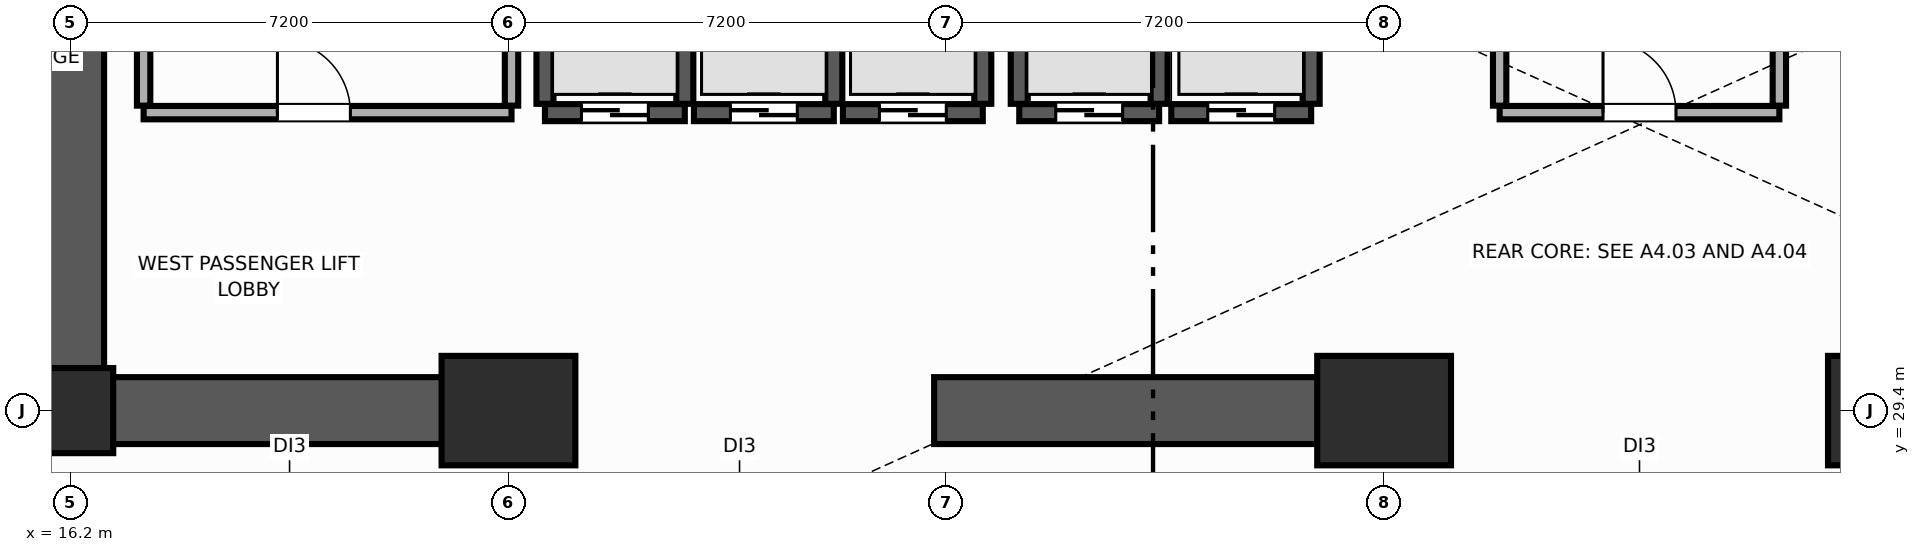
"""IFC4 building model, lengths in metres.
Left out: names, types, materials, properties, quantities, classifications, styles, units other than length and angle.
Written with IfcOpenShell. Run it as: python <this file> out.ifc"""

import sys

from ifc_helpers import new_model, si_unit, direction, frame, frame_2d, origin, origin_2d, place, context, subcontext, project, spatial, rectangle, extrude, element, fill, save


model = new_model("IFC4")
c1 = context("Model", 3, precision=1e-05, world=origin(), true_north=direction((0.0, 1.0)))
c2 = subcontext(c1, "Body", "Model", "MODEL_VIEW")
j1 = project(units=[si_unit("LENGTHUNIT", "METRE"), si_unit("PLANEANGLEUNIT", "RADIAN")], contexts=[c1])
p1 = place(None, origin())
s1 = spatial("IfcSite", under=j1, at=p1, CompositionType="ELEMENT")
p2 = place(p1, origin())
s2 = spatial("IfcBuilding", under=s1, at=p2, CompositionType="ELEMENT")
p3 = place(p2, origin())
s3 = spatial("IfcBuildingStorey", under=s2, at=p3, CompositionType="ELEMENT", Elevation=0.0)
for number, where, z_axis, x_axis in (
    (1, (23.4, 29.4, 0.0), (0.0, 0.0, 1.0), (1.0, 0.0, 0.0)),
    (2, (37.8, 29.4, 0.0), (0.0, 0.0, 1.0), (1.0, 0.0, 0.0)),
    (3, (46.2, 29.4, 0.0), (0.0, 0.0, 1.0), (1.0, 0.0, 0.0)),
):
    element("IfcColumn", number, at=place(p3, frame(where, z_axis=z_axis, x_axis=x_axis)), inside=s3, PredefinedType="USERDEFINED", context=c2, shape_type="SweptSolid", body=[
        extrude(rectangle(XDim=2.2, YDim=1.8, at=origin_2d()), origin(), (0.0, 0.0, 1.0), 7.68),
    ])
p4 = place(p3, frame((16.2, 29.4, 0.0), z_axis=(0.0, 0.0, 1.0), x_axis=(1.0, 0.0, 0.0)))
e4 = element("IfcColumn", 4, at=p4, inside=s3, PredefinedType="COLUMN", context=c2, shape_type="SweptSolid", body=[
    extrude(rectangle(XDim=1.4, YDim=1.4, at=origin_2d()), origin(), (0.0, 0.0, 1.0), 7.68),
])
p5 = place(p3, frame((16.2, 29.4, 0.0), z_axis=(0.0, 0.0, 1.0), x_axis=(0.0, 1.0, 0.0)))
e5 = element("IfcWall", 5, at=p5, inside=s3, PredefinedType="SHEAR", context=c2, shape_type="SweptSolid", body=[
    extrude(rectangle(XDim=19.2, YDim=1.1, at=frame_2d((9.6, 0.0))), origin(), (0.0, 0.0, 1.0), 7.68),
])
p6 = place(p3, frame((16.755, 29.4, 0.0), z_axis=(0.0, 0.0, 1.0), x_axis=(1.0, 0.0, 0.0)))
e6 = element("IfcWall", 6, at=p6, inside=s3, PredefinedType="SHEAR", context=c2, shape_type="SweptSolid", body=[
    extrude(rectangle(XDim=6.845, YDim=1.1, at=frame_2d((3.423, 0.0))), origin(), (0.0, 0.0, 1.0), 7.68),
])
p7 = place(p3, frame((30.4, 29.4, 0.0), z_axis=(0.0, 0.0, 1.0), x_axis=(1.0, 0.0, 0.0)))
e7 = element("IfcWall", 7, at=p7, inside=s3, PredefinedType="SHEAR", context=c2, shape_type="SweptSolid", body=[
    extrude(rectangle(XDim=7.6, YDim=1.1, at=frame_2d((3.8, 0.0))), origin(), (0.0, 0.0, 1.0), 7.68),
])
p8 = place(p3, frame((24.0, 34.3, 0.0), z_axis=(0.0, 0.0, 1.0), x_axis=(1.0, 0.0, 0.0)))
e8 = element("IfcWall", 8, at=p8, inside=s3, PredefinedType="SHEAR", context=c2, shape_type="SweptSolid", body=[
    extrude(rectangle(XDim=2.3, YDim=0.28, at=frame_2d((1.15, 0.0))), origin(), (0.0, 0.0, 1.0), 7.68),
])
p9 = place(p8, frame((0.6, 0.0, 0.0)))
e9 = element("IfcOpeningElement", 9, at=p9, cuts=e8, PredefinedType="OPENING", context=c2, shape_type="SweptSolid", body=[
    extrude(rectangle(XDim=1.1, YDim=2.2, at=frame_2d((0.55, 1.1))), frame((0.0, 0.15, 0.0), z_axis=(0.0, -1.0, 0.0), x_axis=(1.0, 0.0, 0.0)), (0.0, 0.0, 1.0), 0.3),
])
for number, where, z_axis, x_axis in (
    (10, (24.0, 34.445, 0.0), (0.0, 0.0, 1.0), (0.0, 1.0, 0.0)),
    (11, (26.3, 34.445, 0.0), (0.0, 0.0, 1.0), (0.0, 1.0, 0.0)),
):
    element("IfcWall", number, at=place(p3, frame(where, z_axis=z_axis, x_axis=x_axis)), inside=s3, PredefinedType="SHEAR", context=c2, shape_type="SweptSolid", body=[
        extrude(rectangle(XDim=2.01, YDim=0.28, at=frame_2d((1.005, 0.0))), origin(), (0.0, 0.0, 1.0), 7.68),
    ])
p10 = place(p3, frame((26.45, 34.3, 0.0), z_axis=(0.0, 0.0, 1.0), x_axis=(1.0, 0.0, 0.0)))
e12 = element("IfcWall", 12, at=p10, inside=s3, PredefinedType="SHEAR", context=c2, shape_type="SweptSolid", body=[
    extrude(rectangle(XDim=2.3, YDim=0.28, at=frame_2d((1.15, 0.0))), origin(), (0.0, 0.0, 1.0), 7.68),
])
p11 = place(p10, frame((0.6, 0.0, 0.0)))
e13 = element("IfcOpeningElement", 13, at=p11, cuts=e12, PredefinedType="OPENING", context=c2, shape_type="SweptSolid", body=[
    extrude(rectangle(XDim=1.1, YDim=2.2, at=frame_2d((0.55, 1.1))), frame((0.0, 0.15, 0.0), z_axis=(0.0, -1.0, 0.0), x_axis=(1.0, 0.0, 0.0)), (0.0, 0.0, 1.0), 0.3),
])
p12 = place(p3, frame((28.75, 34.445, 0.0), z_axis=(0.0, 0.0, 1.0), x_axis=(0.0, 1.0, 0.0)))
e14 = element("IfcWall", 14, at=p12, inside=s3, PredefinedType="SHEAR", context=c2, shape_type="SweptSolid", body=[
    extrude(rectangle(XDim=2.01, YDim=0.28, at=frame_2d((1.005, 0.0))), origin(), (0.0, 0.0, 1.0), 7.68),
])
p13 = place(p3, frame((28.9, 34.3, 0.0), z_axis=(0.0, 0.0, 1.0), x_axis=(1.0, 0.0, 0.0)))
e15 = element("IfcWall", 15, at=p13, inside=s3, PredefinedType="SHEAR", context=c2, shape_type="SweptSolid", body=[
    extrude(rectangle(XDim=2.3, YDim=0.28, at=frame_2d((1.15, 0.0))), origin(), (0.0, 0.0, 1.0), 7.68),
])
p14 = place(p13, frame((0.6, 0.0, 0.0)))
e16 = element("IfcOpeningElement", 16, at=p14, cuts=e15, PredefinedType="OPENING", context=c2, shape_type="SweptSolid", body=[
    extrude(rectangle(XDim=1.1, YDim=2.2, at=frame_2d((0.55, 1.1))), frame((0.0, 0.15, 0.0), z_axis=(0.0, -1.0, 0.0), x_axis=(1.0, 0.0, 0.0)), (0.0, 0.0, 1.0), 0.3),
])
p15 = place(p3, frame((31.2, 34.445, 0.0), z_axis=(0.0, 0.0, 1.0), x_axis=(0.0, 1.0, 0.0)))
e17 = element("IfcWall", 17, at=p15, inside=s3, PredefinedType="SHEAR", context=c2, shape_type="SweptSolid", body=[
    extrude(rectangle(XDim=2.01, YDim=0.28, at=frame_2d((1.005, 0.0))), origin(), (0.0, 0.0, 1.0), 7.68),
])
p16 = place(p3, frame((31.8, 34.3, 0.0), z_axis=(0.0, 0.0, 1.0), x_axis=(1.0, 0.0, 0.0)))
e18 = element("IfcWall", 18, at=p16, inside=s3, PredefinedType="SHEAR", context=c2, shape_type="SweptSolid", body=[
    extrude(rectangle(XDim=2.3, YDim=0.28, at=frame_2d((1.15, 0.0))), origin(), (0.0, 0.0, 1.0), 7.68),
])
p17 = place(p16, frame((0.6, 0.0, 0.0)))
e19 = element("IfcOpeningElement", 19, at=p17, cuts=e18, PredefinedType="OPENING", context=c2, shape_type="SweptSolid", body=[
    extrude(rectangle(XDim=1.1, YDim=2.2, at=frame_2d((0.55, 1.1))), frame((0.0, 0.15, 0.0), z_axis=(0.0, -1.0, 0.0), x_axis=(1.0, 0.0, 0.0)), (0.0, 0.0, 1.0), 0.3),
])
for number, where, z_axis, x_axis in (
    (20, (31.8, 34.445, 0.0), (0.0, 0.0, 1.0), (0.0, 1.0, 0.0)),
    (21, (34.1, 34.445, 0.0), (0.0, 0.0, 1.0), (0.0, 1.0, 0.0)),
):
    element("IfcWall", number, at=place(p3, frame(where, z_axis=z_axis, x_axis=x_axis)), inside=s3, PredefinedType="SHEAR", context=c2, shape_type="SweptSolid", body=[
        extrude(rectangle(XDim=2.01, YDim=0.28, at=frame_2d((1.005, 0.0))), origin(), (0.0, 0.0, 1.0), 7.68),
    ])
p18 = place(p3, frame((34.3, 34.3, 0.0), z_axis=(0.0, 0.0, 1.0), x_axis=(1.0, 0.0, 0.0)))
e22 = element("IfcWall", 22, at=p18, inside=s3, PredefinedType="SHEAR", context=c2, shape_type="SweptSolid", body=[
    extrude(rectangle(XDim=2.3, YDim=0.28, at=frame_2d((1.15, 0.0))), origin(), (0.0, 0.0, 1.0), 7.68),
])
p19 = place(p18, frame((0.6, 0.0, 0.0)))
e23 = element("IfcOpeningElement", 23, at=p19, cuts=e22, PredefinedType="OPENING", context=c2, shape_type="SweptSolid", body=[
    extrude(rectangle(XDim=1.1, YDim=2.2, at=frame_2d((0.55, 1.1))), frame((0.0, 0.15, 0.0), z_axis=(0.0, -1.0, 0.0), x_axis=(1.0, 0.0, 0.0)), (0.0, 0.0, 1.0), 0.3),
])
p20 = place(p3, frame((36.6, 34.445, 0.0), z_axis=(0.0, 0.0, 1.0), x_axis=(0.0, 1.0, 0.0)))
e24 = element("IfcWall", 24, at=p20, inside=s3, PredefinedType="SHEAR", context=c2, shape_type="SweptSolid", body=[
    extrude(rectangle(XDim=2.01, YDim=0.28, at=frame_2d((1.005, 0.0))), origin(), (0.0, 0.0, 1.0), 7.68),
])
p21 = place(p3, frame((17.4, 34.3, 0.0), z_axis=(0.0, 0.0, 1.0), x_axis=(1.0, 0.0, 0.0)))
e25 = element("IfcWall", 25, at=p21, inside=s3, PredefinedType="PARTITIONING", context=c2, shape_type="SweptSolid", body=[
    extrude(rectangle(XDim=6.05, YDim=0.22, at=frame_2d((3.025, 0.0))), origin(), (0.0, 0.0, 1.0), 7.68),
])
p22 = place(p21, frame((2.2, 0.0, 0.0)))
e26 = element("IfcOpeningElement", 26, at=p22, cuts=e25, PredefinedType="OPENING", context=c2, shape_type="SweptSolid", body=[
    extrude(rectangle(XDim=1.2, YDim=2.15, at=frame_2d((0.6, 1.075))), frame((0.0, 0.12, 0.0), z_axis=(0.0, -1.0, 0.0), x_axis=(1.0, 0.0, 0.0)), (0.0, 0.0, 1.0), 0.24),
])
p23 = place(p3, frame((17.4, 34.415, 0.0), z_axis=(0.0, 0.0, 1.0), x_axis=(0.0, 1.0, 0.0)))
e27 = element("IfcWall", 27, at=p23, inside=s3, PredefinedType="PARTITIONING", context=c2, shape_type="SweptSolid", body=[
    extrude(rectangle(XDim=5.43, YDim=0.22, at=frame_2d((2.715, 0.0))), origin(), (0.0, 0.0, 1.0), 7.68),
])
p24 = place(p3, frame((23.45, 34.415, 0.0), z_axis=(0.0, 0.0, 1.0), x_axis=(0.0, 1.0, 0.0)))
e28 = element("IfcWall", 28, at=p24, inside=s3, PredefinedType="PARTITIONING", context=c2, shape_type="SweptSolid", body=[
    extrude(rectangle(XDim=5.64, YDim=0.22, at=frame_2d((2.82, 0.0))), origin(), (0.0, 0.0, 1.0), 7.68),
])
p25 = place(p24, frame((3.385, 0.0, 0.0)))
e29 = element("IfcOpeningElement", 29, at=p25, cuts=e28, PredefinedType="OPENING", context=c2, shape_type="SweptSolid", body=[
    extrude(rectangle(XDim=1.2, YDim=2.15, at=frame_2d((0.6, 1.075))), frame((0.0, 0.12, 0.0), z_axis=(0.0, -1.0, 0.0), x_axis=(1.0, 0.0, 0.0)), (0.0, 0.0, 1.0), 0.24),
])
p26 = place(p3, frame((39.7, 34.3, 0.0), z_axis=(0.0, 0.0, 1.0), x_axis=(1.0, 0.0, 0.0)))
e30 = element("IfcWall", 30, at=p26, inside=s3, PredefinedType="PARTITIONING", context=c2, shape_type="SweptSolid", body=[
    extrude(rectangle(XDim=4.6, YDim=0.22, at=frame_2d((2.3, 0.0))), origin(), (0.0, 0.0, 1.0), 7.68),
])
p27 = place(p26, frame((1.7, 0.0, 0.0)))
e31 = element("IfcOpeningElement", 31, at=p27, cuts=e30, PredefinedType="OPENING", context=c2, shape_type="SweptSolid", body=[
    extrude(rectangle(XDim=1.2, YDim=2.15, at=frame_2d((0.6, 1.075))), frame((0.0, 0.12, 0.0), z_axis=(0.0, -1.0, 0.0), x_axis=(1.0, 0.0, 0.0)), (0.0, 0.0, 1.0), 0.24),
])
p28 = place(p3, frame((39.7, 34.415, 0.0), z_axis=(0.0, 0.0, 1.0), x_axis=(0.0, 1.0, 0.0)))
e32 = element("IfcWall", 32, at=p28, inside=s3, PredefinedType="PARTITIONING", context=c2, shape_type="SweptSolid", body=[
    extrude(rectangle(XDim=5.785, YDim=0.22, at=frame_2d((2.893, 0.0))), origin(), (0.0, 0.0, 1.0), 7.68),
])
p29 = place(p28, frame((3.385, 0.0, 0.0)))
e33 = element("IfcOpeningElement", 33, at=p29, cuts=e32, PredefinedType="OPENING", context=c2, shape_type="SweptSolid", body=[
    extrude(rectangle(XDim=1.2, YDim=2.15, at=frame_2d((0.6, 1.075))), frame((0.0, 0.12, 0.0), z_axis=(0.0, -1.0, 0.0), x_axis=(1.0, 0.0, 0.0)), (0.0, 0.0, 1.0), 0.24),
])
p30 = place(p3, frame((44.3, 34.415, 0.0), z_axis=(0.0, 0.0, 1.0), x_axis=(0.0, 1.0, 0.0)))
e34 = element("IfcWall", 34, at=p30, inside=s3, PredefinedType="PARTITIONING", context=c2, shape_type="SweptSolid", body=[
    extrude(rectangle(XDim=5.785, YDim=0.22, at=frame_2d((2.893, 0.0))), origin(), (0.0, 0.0, 1.0), 7.68),
])
p31 = place(p9, origin())
e35 = element("IfcDoor", 35, at=p31, inside=s3, OperationType="DOUBLE_DOOR_SLIDING", PredefinedType="DOOR", context=c2, shape_type="SweptSolid", body=[
    extrude(rectangle(XDim=1.1, YDim=2.2, at=frame_2d((0.55, 1.1))), frame((0.0, 0.025, 0.0), z_axis=(0.0, -1.0, 0.0), x_axis=(1.0, 0.0, 0.0)), (0.0, 0.0, 1.0), 0.05),
])
fill(e9, e35)
p32 = place(p11, origin())
e36 = element("IfcDoor", 36, at=p32, inside=s3, OperationType="DOUBLE_DOOR_SLIDING", PredefinedType="DOOR", context=c2, shape_type="SweptSolid", body=[
    extrude(rectangle(XDim=1.1, YDim=2.2, at=frame_2d((0.55, 1.1))), frame((0.0, 0.025, 0.0), z_axis=(0.0, -1.0, 0.0), x_axis=(1.0, 0.0, 0.0)), (0.0, 0.0, 1.0), 0.05),
])
fill(e13, e36)
p33 = place(p14, origin())
e37 = element("IfcDoor", 37, at=p33, inside=s3, OperationType="DOUBLE_DOOR_SLIDING", PredefinedType="DOOR", context=c2, shape_type="SweptSolid", body=[
    extrude(rectangle(XDim=1.1, YDim=2.2, at=frame_2d((0.55, 1.1))), frame((0.0, 0.025, 0.0), z_axis=(0.0, -1.0, 0.0), x_axis=(1.0, 0.0, 0.0)), (0.0, 0.0, 1.0), 0.05),
])
fill(e16, e37)
p34 = place(p17, origin())
e38 = element("IfcDoor", 38, at=p34, inside=s3, OperationType="DOUBLE_DOOR_SLIDING", PredefinedType="DOOR", context=c2, shape_type="SweptSolid", body=[
    extrude(rectangle(XDim=1.1, YDim=2.2, at=frame_2d((0.55, 1.1))), frame((0.0, 0.025, 0.0), z_axis=(0.0, -1.0, 0.0), x_axis=(1.0, 0.0, 0.0)), (0.0, 0.0, 1.0), 0.05),
])
fill(e19, e38)
p35 = place(p19, origin())
e39 = element("IfcDoor", 39, at=p35, inside=s3, OperationType="DOUBLE_DOOR_SLIDING", PredefinedType="DOOR", context=c2, shape_type="SweptSolid", body=[
    extrude(rectangle(XDim=1.1, YDim=2.2, at=frame_2d((0.55, 1.1))), frame((0.0, 0.025, 0.0), z_axis=(0.0, -1.0, 0.0), x_axis=(1.0, 0.0, 0.0)), (0.0, 0.0, 1.0), 0.05),
])
fill(e23, e39)
p36 = place(p22, origin())
e40 = element("IfcDoor", 40, at=p36, inside=s3, OperationType="SINGLE_SWING_LEFT", PredefinedType="DOOR", context=c2, shape_type="SweptSolid", body=[
    extrude(rectangle(XDim=1.2, YDim=2.15, at=frame_2d((0.6, 1.075))), frame((0.0, 0.025, 0.0), z_axis=(0.0, -1.0, 0.0), x_axis=(1.0, 0.0, 0.0)), (0.0, 0.0, 1.0), 0.05),
])
fill(e26, e40)
p37 = place(p27, origin())
e41 = element("IfcDoor", 41, at=p37, inside=s3, OperationType="SINGLE_SWING_LEFT", PredefinedType="DOOR", context=c2, shape_type="SweptSolid", body=[
    extrude(rectangle(XDim=1.2, YDim=2.15, at=frame_2d((0.6, 1.075))), frame((0.0, 0.025, 0.0), z_axis=(0.0, -1.0, 0.0), x_axis=(1.0, 0.0, 0.0)), (0.0, 0.0, 1.0), 0.05),
])
fill(e31, e41)
save(model, sys.argv[1])
